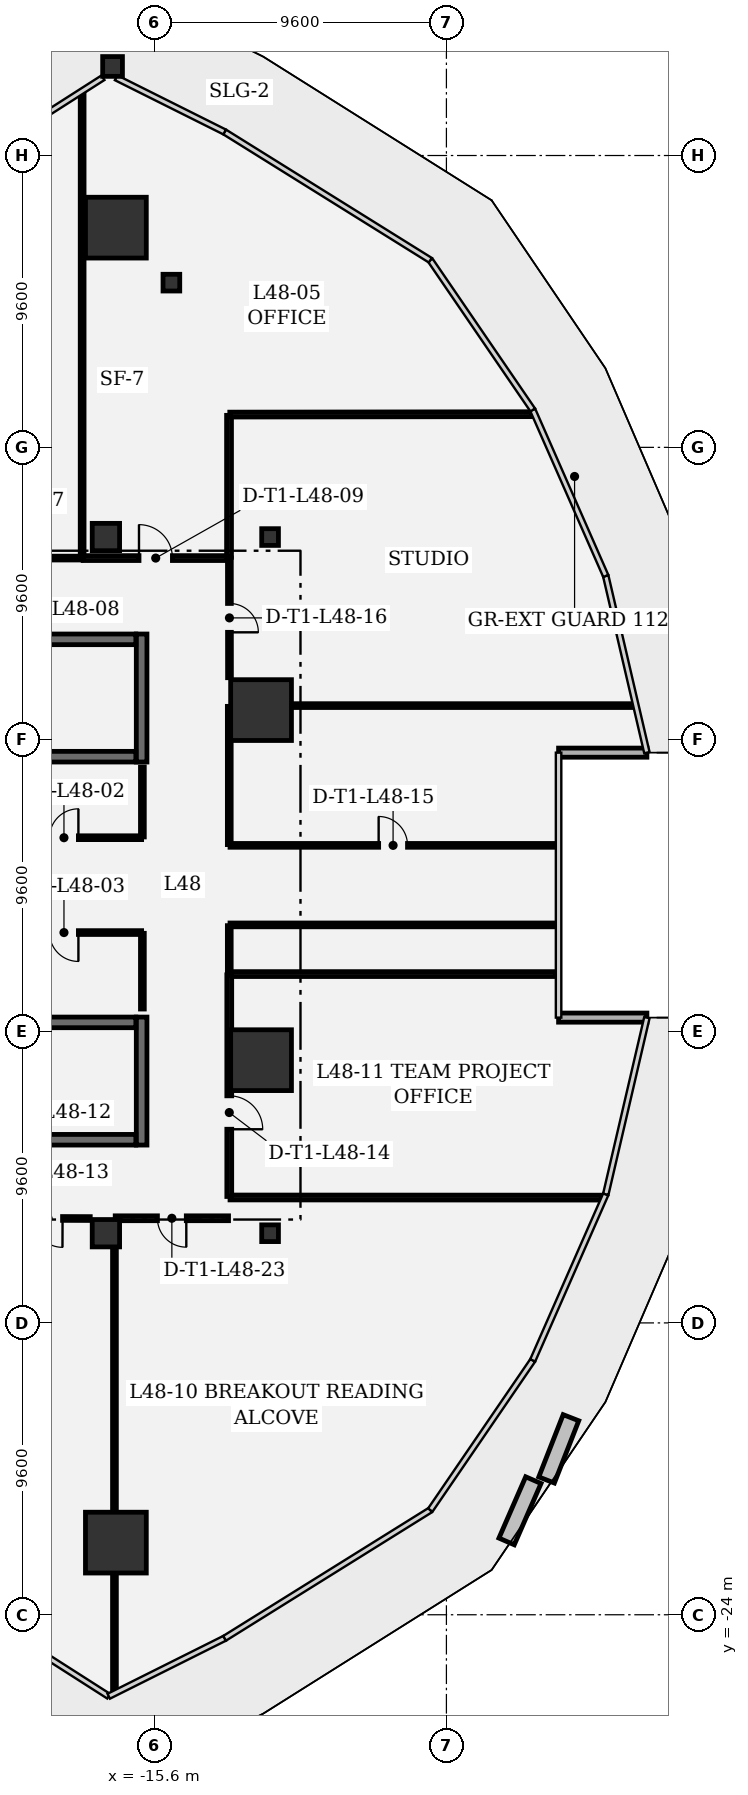
"""IFC4 building model, lengths in metres.
Left out: names, types, materials, properties, quantities, classifications, styles, units other than length and angle.
Written with IfcOpenShell. Run it as: python <this file> out.ifc"""

import sys

from ifc_helpers import new_model, si_unit, direction, frame, frame_2d, origin, origin_2d, place, context, subcontext, project, spatial, rectangle, extrude, element, fill, save


model = new_model("IFC4")
c1 = context("Model", 3, precision=1e-05, world=origin(), true_north=direction((0.0, 1.0)))
c2 = subcontext(c1, "Body", "Model", "MODEL_VIEW")
j1 = project(units=[si_unit("LENGTHUNIT", "METRE"), si_unit("PLANEANGLEUNIT", "RADIAN")], contexts=[c1])
p1 = place(None, origin())
s1 = spatial("IfcSite", under=j1, at=p1, CompositionType="ELEMENT")
p2 = place(p1, origin())
s2 = spatial("IfcBuilding", under=s1, at=p2, CompositionType="ELEMENT")
p3 = place(p2, frame((0.0, 0.0, 209.1)))
s3 = spatial("IfcBuildingStorey", under=s2, at=p3, CompositionType="ELEMENT", Elevation=209.1)
for number, where, z_axis, x_axis in (
    (1, (-16.872, -21.627, 0.0), (0.0, 0.0, 1.0), (1.0, 0.0, 0.0)),
    (2, (-12.097, -5.758, 0.0), (0.0, 0.0, 1.0), (1.0, 0.0, 0.0)),
    (3, (-12.097, 5.758, 0.0), (0.0, 0.0, 1.0), (1.0, 0.0, 0.0)),
    (4, (-16.872, 21.627, 0.0), (0.0, 0.0, 1.0), (1.0, 0.0, 0.0)),
):
    element("IfcColumn", number, at=place(p3, frame(where, z_axis=z_axis, x_axis=x_axis)), inside=s3, PredefinedType="COLUMN", context=c2, shape_type="SweptSolid", body=[
        extrude(rectangle(XDim=2.0, YDim=2.0, at=origin_2d()), origin(), (0.0, 0.0, 1.0), 4.05),
    ])
for number, where, z_axis, x_axis in (
    (5, (-17.2, 11.45, 0.0), (0.0, 0.0, 1.0), (1.0, 0.0, 0.0)),
    (6, (-17.2, -11.45, 0.0), (0.0, 0.0, 1.0), (1.0, 0.0, 0.0)),
):
    element("IfcColumn", number, at=place(p3, frame(where, z_axis=z_axis, x_axis=x_axis)), inside=s3, PredefinedType="COLUMN", context=c2, shape_type="SweptSolid", body=[
        extrude(rectangle(XDim=0.9, YDim=0.9, at=origin_2d()), origin(), (0.0, 0.0, 1.0), 4.05),
    ])
p4 = place(p3, frame((-16.981, 26.929, 0.0), z_axis=(0.0, 0.0, 1.0), x_axis=(1.0, 0.0, 0.0)))
e7 = element("IfcColumn", 7, at=p4, inside=s3, PredefinedType="COLUMN", context=c2, shape_type="SweptSolid", body=[
    extrude(rectangle(XDim=0.65, YDim=0.65, at=origin_2d()), origin(), (0.0, 0.0, 1.0), 4.05),
])
for number, where, z_axis, x_axis in (
    (8, (-15.046, 19.818, 0.0), (0.0, 0.0, 1.0), (1.0, 0.0, 0.0)),
    (9, (-11.8, -11.45, 0.0), (0.0, 0.0, 1.0), (1.0, 0.0, 0.0)),
    (10, (-11.8, 11.45, 0.0), (0.0, 0.0, 1.0), (1.0, 0.0, 0.0)),
):
    element("IfcColumn", number, at=place(p3, frame(where, z_axis=z_axis, x_axis=x_axis)), inside=s3, PredefinedType="COLUMN", context=c2, shape_type="SweptSolid", body=[
        extrude(rectangle(XDim=0.55, YDim=0.55, at=origin_2d()), origin(), (0.0, 0.0, 1.0), 4.05),
    ])
for number, where, z_axis, x_axis in (
    (11, (0.594, -4.358, 0.0), (0.0, 0.0, 1.0), (-1.0, 0.0, 0.0)),
    (12, (-2.311, 4.358, 0.0), (0.0, 0.0, 1.0), (1.0, 0.0, 0.0)),
):
    element("IfcWall", number, at=place(p3, frame(where, z_axis=z_axis, x_axis=x_axis)), inside=s3, PredefinedType="SOLIDWALL", context=c2, shape_type="SweptSolid", body=[
        extrude(rectangle(XDim=2.905, YDim=0.3, at=frame_2d((1.453, 0.0))), origin(), (0.0, 0.0, 1.0), 3.78),
    ])
p5 = place(p3, frame((-16.025, 4.05, 0.0), z_axis=(0.0, 0.0, 1.0), x_axis=(0.0, 1.0, 0.0)))
e13 = element("IfcWall", 13, at=p5, inside=s3, PredefinedType="SHEAR", context=c2, shape_type="SweptSolid", body=[
    extrude(rectangle(XDim=4.21, YDim=0.35, at=frame_2d((2.105, 0.0))), origin(), (0.0, 0.0, 1.0), 3.78),
])
p6 = place(p3, frame((-24.335, 4.225, 0.0), z_axis=(0.0, 0.0, 1.0), x_axis=(1.0, 0.0, 0.0)))
e14 = element("IfcWall", 14, at=p6, inside=s3, PredefinedType="SHEAR", context=c2, shape_type="SweptSolid", body=[
    extrude(rectangle(XDim=8.12, YDim=0.35, at=frame_2d((4.06, 0.0))), origin(), (0.0, 0.0, 1.0), 3.78),
])
p7 = place(p3, frame((-16.215, 8.085, 0.0), z_axis=(0.0, 0.0, 1.0), x_axis=(-1.0, 0.0, 0.0)))
e15 = element("IfcWall", 15, at=p7, inside=s3, PredefinedType="SHEAR", context=c2, shape_type="SweptSolid", body=[
    extrude(rectangle(XDim=8.12, YDim=0.35, at=frame_2d((4.06, 0.0))), origin(), (0.0, 0.0, 1.0), 3.78),
])
p8 = place(p7, frame((6.74, 0.0, 0.0)))
e16 = element("IfcOpeningElement", 16, at=p8, cuts=e15, PredefinedType="OPENING", context=c2, shape_type="SweptSolid", body=[
    extrude(rectangle(XDim=1.1, YDim=2.2, at=frame_2d((0.55, 1.1))), frame((0.0, 0.185, 0.0), z_axis=(0.0, -1.0, 0.0), x_axis=(1.0, 0.0, 0.0)), (0.0, 0.0, 1.0), 0.37),
])
p9 = place(p3, frame((-16.025, -8.55, 0.0), z_axis=(0.0, 0.0, 1.0), x_axis=(0.0, 1.0, 0.0)))
e17 = element("IfcWall", 17, at=p9, inside=s3, PredefinedType="SHEAR", context=c2, shape_type="SweptSolid", body=[
    extrude(rectangle(XDim=4.21, YDim=0.35, at=frame_2d((2.105, 0.0))), origin(), (0.0, 0.0, 1.0), 3.78),
])
p10 = place(p3, frame((-24.335, -8.375, 0.0), z_axis=(0.0, 0.0, 1.0), x_axis=(1.0, 0.0, 0.0)))
e18 = element("IfcWall", 18, at=p10, inside=s3, PredefinedType="SHEAR", context=c2, shape_type="SweptSolid", body=[
    extrude(rectangle(XDim=8.12, YDim=0.35, at=frame_2d((4.06, 0.0))), origin(), (0.0, 0.0, 1.0), 3.78),
])
p11 = place(p10, frame((0.28, 0.0, 0.0)))
e19 = element("IfcOpeningElement", 19, at=p11, cuts=e18, PredefinedType="OPENING", context=c2, shape_type="SweptSolid", body=[
    extrude(rectangle(XDim=1.1, YDim=2.2, at=frame_2d((0.55, 1.1))), frame((0.0, 0.185, 0.0), z_axis=(0.0, -1.0, 0.0), x_axis=(1.0, 0.0, 0.0)), (0.0, 0.0, 1.0), 0.37),
])
p12 = place(p3, frame((-16.215, -4.515, 0.0), z_axis=(0.0, 0.0, 1.0), x_axis=(-1.0, 0.0, 0.0)))
e20 = element("IfcWall", 20, at=p12, inside=s3, PredefinedType="SHEAR", context=c2, shape_type="SweptSolid", body=[
    extrude(rectangle(XDim=8.12, YDim=0.35, at=frame_2d((4.06, 0.0))), origin(), (0.0, 0.0, 1.0), 3.78),
])
p13 = place(p3, frame((-21.134, 1.56, 0.0), z_axis=(0.0, 0.0, 1.0), x_axis=(1.0, 0.0, 0.0)))
e21 = element("IfcWall", 21, at=p13, inside=s3, PredefinedType="PARTITIONING", context=c2, shape_type="SweptSolid", body=[
    extrude(rectangle(XDim=5.109, YDim=0.125, at=frame_2d((2.554, 0.0))), origin(), (0.0, 0.0, 1.0), 3.78),
])
p14 = place(p13, frame((2.079, 0.0, 0.0)))
e22 = element("IfcOpeningElement", 22, at=p14, cuts=e21, PredefinedType="OPENING", context=c2, shape_type="SweptSolid", body=[
    extrude(rectangle(XDim=0.95, YDim=2.15, at=frame_2d((0.475, 1.075))), frame((0.0, 0.073, 0.0), z_axis=(0.0, -1.0, 0.0), x_axis=(1.0, 0.0, 0.0)), (0.0, 0.0, 1.0), 0.145),
])
p15 = place(p3, frame((-16.0, 1.585, 0.0), z_axis=(0.0, 0.0, 1.0), x_axis=(0.0, 1.0, 0.0)))
e23 = element("IfcWall", 23, at=p15, inside=s3, PredefinedType="PARTITIONING", context=c2, shape_type="SweptSolid", body=[
    extrude(rectangle(XDim=2.302, YDim=0.125, at=frame_2d((1.151, 0.0))), origin(), (0.0, 0.0, 1.0), 3.78),
])
p16 = place(p3, frame((-16.0, -4.075, 0.0), z_axis=(0.0, 0.0, 1.0), x_axis=(0.0, 1.0, 0.0)))
e24 = element("IfcWall", 24, at=p16, inside=s3, PredefinedType="PARTITIONING", context=c2, shape_type="SweptSolid", body=[
    extrude(rectangle(XDim=2.49, YDim=0.125, at=frame_2d((1.245, 0.0))), origin(), (0.0, 0.0, 1.0), 3.78),
])
p17 = place(p3, frame((-16.025, -1.56, 0.0), z_axis=(0.0, 0.0, 1.0), x_axis=(-1.0, 0.0, 0.0)))
e25 = element("IfcWall", 25, at=p17, inside=s3, PredefinedType="PARTITIONING", context=c2, shape_type="SweptSolid", body=[
    extrude(rectangle(XDim=5.109, YDim=0.125, at=frame_2d((2.554, 0.0))), origin(), (0.0, 0.0, 1.0), 3.78),
])
p18 = place(p17, frame((2.079, 0.0, 0.0)))
e26 = element("IfcOpeningElement", 26, at=p18, cuts=e25, PredefinedType="OPENING", context=c2, shape_type="SweptSolid", body=[
    extrude(rectangle(XDim=0.95, YDim=2.15, at=frame_2d((0.475, 1.075))), frame((0.0, 0.073, 0.0), z_axis=(0.0, -1.0, 0.0), x_axis=(1.0, 0.0, 0.0)), (0.0, 0.0, 1.0), 0.145),
])
p19 = place(p3, frame((-22.948, 10.758, 0.0), z_axis=(0.0, 0.0, 1.0), x_axis=(1.0, 0.0, 0.0)))
e27 = element("IfcWall", 27, at=p19, inside=s3, PredefinedType="PARTITIONING", context=c2, shape_type="SweptSolid", body=[
    extrude(rectangle(XDim=4.942, YDim=0.125, at=frame_2d((2.471, 0.0))), origin(), (0.0, 0.0, 1.0), 3.78),
])
p20 = place(p19, frame((1.996, 0.0, 0.0)))
e28 = element("IfcOpeningElement", 28, at=p20, cuts=e27, PredefinedType="OPENING", context=c2, shape_type="SweptSolid", body=[
    extrude(rectangle(XDim=0.95, YDim=2.15, at=frame_2d((0.475, 1.075))), frame((0.0, 0.073, 0.0), z_axis=(0.0, -1.0, 0.0), x_axis=(1.0, 0.0, 0.0)), (0.0, 0.0, 1.0), 0.145),
])
p21 = place(p3, frame((-17.981, 10.783, 0.0), z_axis=(0.0, 0.0, 1.0), x_axis=(0.0, 1.0, 0.0)))
e29 = element("IfcWall", 29, at=p21, inside=s3, PredefinedType="PARTITIONING", context=c2, shape_type="SweptSolid", body=[
    extrude(rectangle(XDim=15.258, YDim=0.125, at=frame_2d((7.629, 0.0))), origin(), (0.0, 0.0, 1.0), 2.895),
])
p22 = place(p3, frame((-17.948, 10.758, 0.0), z_axis=(0.0, 0.0, 1.0), x_axis=(1.0, 0.0, 0.0)))
e30 = element("IfcWall", 30, at=p22, inside=s3, PredefinedType="PARTITIONING", context=c2, shape_type="SweptSolid", body=[
    extrude(rectangle(XDim=4.774, YDim=0.16, at=frame_2d((2.387, 0.0))), origin(), (0.0, 0.0, 1.0), 3.344),
])
p23 = place(p22, frame((1.837, 0.0, 0.0)))
e31 = element("IfcOpeningElement", 31, at=p23, cuts=e30, PredefinedType="OPENING", context=c2, shape_type="SweptSolid", body=[
    extrude(rectangle(XDim=1.1, YDim=2.15, at=frame_2d((0.55, 1.075))), frame((0.0, 0.09, 0.0), z_axis=(0.0, -1.0, 0.0), x_axis=(1.0, 0.0, 0.0)), (0.0, 0.0, 1.0), 0.18),
])
p24 = place(p3, frame((-13.15, 15.453, 0.0), z_axis=(0.0, 0.0, 1.0), x_axis=(0.0, -1.0, 0.0)))
e32 = element("IfcWall", 32, at=p24, inside=s3, PredefinedType="PARTITIONING", context=c2, shape_type="SweptSolid", body=[
    extrude(rectangle(XDim=4.67, YDim=0.16, at=frame_2d((2.335, 0.0))), origin(), (0.0, 0.0, 1.0), 2.9),
])
p25 = place(p3, frame((-13.125, 15.478, 0.0), z_axis=(0.0, 0.0, 1.0), x_axis=(0.999999153788, 0.001300931643, 0.0)))
e33 = element("IfcWall", 33, at=p25, inside=s3, PredefinedType="PARTITIONING", context=c2, shape_type="SweptSolid", body=[
    extrude(rectangle(XDim=9.946, YDim=0.16, at=frame_2d((4.973, 0.0))), origin(), (0.0, 0.0, 1.0), 3.78),
])
p26 = place(p3, frame((-16.919, -26.506, 0.0), z_axis=(0.0, 0.0, 1.0), x_axis=(0.0, 1.0, 0.0)))
e34 = element("IfcWall", 34, at=p26, inside=s3, PredefinedType="PARTITIONING", context=c2, shape_type="SweptSolid", body=[
    extrude(rectangle(XDim=3.814, YDim=0.125, at=frame_2d((1.907, 0.0))), origin(), (0.0, 0.0, 1.0), 3.78),
])
p27 = place(p3, frame((-16.919, -20.562, 0.0), z_axis=(0.0, 0.0, 1.0), x_axis=(0.0, 1.0, 0.0)))
e35 = element("IfcWall", 35, at=p27, inside=s3, PredefinedType="PARTITIONING", context=c2, shape_type="SweptSolid", body=[
    extrude(rectangle(XDim=8.597, YDim=0.125, at=frame_2d((4.298, 0.0))), origin(), (0.0, 0.0, 1.0), 2.9),
])
p28 = place(p3, frame((-17.715, -10.967, 0.0), z_axis=(0.0, 0.0, 1.0), x_axis=(-0.999994395436, 0.003347998857, 0.0)))
e36 = element("IfcWall", 36, at=p28, inside=s3, PredefinedType="PARTITIONING", context=c2, shape_type="SweptSolid", body=[
    extrude(rectangle(XDim=2.771, YDim=0.125, at=frame_2d((1.385, 0.0))), origin(), (0.0, 0.0, 1.0), 3.344),
])
p29 = place(p28, frame((0.91, 0.0, 0.0)))
e37 = element("IfcOpeningElement", 37, at=p29, cuts=e36, PredefinedType="OPENING", context=c2, shape_type="SweptSolid", body=[
    extrude(rectangle(XDim=0.95, YDim=2.15, at=frame_2d((0.475, 1.075))), frame((0.0, 0.073, 0.0), z_axis=(0.0, -1.0, 0.0), x_axis=(1.0, 0.0, 0.0)), (0.0, 0.0, 1.0), 0.145),
])
p30 = place(p3, frame((-0.886, -10.279, 0.0), z_axis=(0.0, 0.0, 1.0), x_axis=(-0.999999928079, 0.0003792642, 0.0)))
e38 = element("IfcWall", 38, at=p30, inside=s3, PredefinedType="PARTITIONING", context=c2, shape_type="SweptSolid", body=[
    extrude(rectangle(XDim=12.231, YDim=0.16, at=frame_2d((6.115, 0.0))), origin(), (0.0, 0.0, 1.0), 3.78),
])
p31 = place(p3, frame((-13.167, -10.958, 0.0), z_axis=(0.0, 0.0, 1.0), x_axis=(-1.0, 0.0, 0.0)))
e39 = element("IfcWall", 39, at=p31, inside=s3, PredefinedType="PARTITIONING", context=c2, shape_type="SweptSolid", body=[
    extrude(rectangle(XDim=3.727, YDim=0.16, at=frame_2d((1.863, 0.0))), origin(), (0.0, 0.0, 1.0), 3.344),
])
p32 = place(p31, frame((1.388, 0.0, 0.0)))
e40 = element("IfcOpeningElement", 40, at=p32, cuts=e39, PredefinedType="OPENING", context=c2, shape_type="SweptSolid", body=[
    extrude(rectangle(XDim=0.95, YDim=2.15, at=frame_2d((0.475, 1.075))), frame((0.0, 0.09, 0.0), z_axis=(0.0, -1.0, 0.0), x_axis=(1.0, 0.0, 0.0)), (0.0, 0.0, 1.0), 0.18),
])
p33 = place(p3, frame((-2.391, -2.926, 0.0), z_axis=(0.0, 0.0, 1.0), x_axis=(-1.0, 0.0, 0.0)))
e41 = element("IfcWall", 41, at=p33, inside=s3, PredefinedType="PARTITIONING", context=c2, shape_type="SweptSolid", body=[
    extrude(rectangle(XDim=10.726, YDim=0.16, at=frame_2d((5.363, 0.0))), origin(), (0.0, 0.0, 1.0), 3.78),
])
p34 = place(p3, frame((-13.142, -2.951, 0.0), z_axis=(0.0, 0.0, 1.0), x_axis=(0.0, -1.0, 0.0)))
e42 = element("IfcWall", 42, at=p34, inside=s3, PredefinedType="PARTITIONING", context=c2, shape_type="SweptSolid", body=[
    extrude(rectangle(XDim=7.291, YDim=0.16, at=frame_2d((3.645, 0.0))), origin(), (0.0, 0.0, 1.0), 2.9),
])
p35 = place(p34, frame((3.979, 0.0, 0.0)))
e43 = element("IfcOpeningElement", 43, at=p35, cuts=e42, PredefinedType="OPENING", context=c2, shape_type="SweptSolid", body=[
    extrude(rectangle(XDim=1.1, YDim=2.15, at=frame_2d((0.55, 1.075))), frame((0.0, 0.09, 0.0), z_axis=(0.0, -1.0, 0.0), x_axis=(1.0, 0.0, 0.0)), (0.0, 0.0, 1.0), 0.18),
])
p36 = place(p3, frame((0.154, 5.906, 0.0), z_axis=(0.0, 0.0, 1.0), x_axis=(-1.0, 0.0, 0.0)))
e44 = element("IfcWall", 44, at=p36, inside=s3, PredefinedType="PARTITIONING", context=c2, shape_type="SweptSolid", body=[
    extrude(rectangle(XDim=11.186, YDim=0.125, at=frame_2d((5.593, 0.0))), origin(), (0.0, 0.0, 1.0), 3.78),
])
p37 = place(p3, frame((-13.142, 5.881, 0.0), z_axis=(0.0, 0.0, 1.0), x_axis=(0.0, -1.0, 0.0)))
e45 = element("IfcWall", 45, at=p37, inside=s3, PredefinedType="PARTITIONING", context=c2, shape_type="SweptSolid", body=[
    extrude(rectangle(XDim=4.548, YDim=0.125, at=frame_2d((2.274, 0.0))), origin(), (0.0, 0.0, 1.0), 3.78),
])
p38 = place(p3, frame((-13.117, 1.308, 0.0), z_axis=(0.0, 0.0, 1.0), x_axis=(1.0, 0.0, 0.0)))
e46 = element("IfcWall", 46, at=p38, inside=s3, PredefinedType="PARTITIONING", context=c2, shape_type="SweptSolid", body=[
    extrude(rectangle(XDim=10.726, YDim=0.125, at=frame_2d((5.363, 0.0))), origin(), (0.0, 0.0, 1.0), 3.78),
])
p39 = place(p38, frame((4.888, 0.0, 0.0)))
e47 = element("IfcOpeningElement", 47, at=p39, cuts=e46, PredefinedType="OPENING", context=c2, shape_type="SweptSolid", body=[
    extrude(rectangle(XDim=0.95, YDim=2.15, at=frame_2d((0.475, 1.075))), frame((0.0, 0.073, 0.0), z_axis=(0.0, -1.0, 0.0), x_axis=(1.0, 0.0, 0.0)), (0.0, 0.0, 1.0), 0.145),
])
p40 = place(p3, frame((-13.117, -1.308, 0.0), z_axis=(0.0, 0.0, 1.0), x_axis=(1.0, 0.0, 0.0)))
e48 = element("IfcWall", 48, at=p40, inside=s3, PredefinedType="PARTITIONING", context=c2, shape_type="SweptSolid", body=[
    extrude(rectangle(XDim=10.726, YDim=0.125, at=frame_2d((5.363, 0.0))), origin(), (0.0, 0.0, 1.0), 3.78),
])
p41 = place(p3, frame((-13.142, -1.333, 0.0), z_axis=(0.0, 0.0, 1.0), x_axis=(0.0, -1.0, 0.0)))
e49 = element("IfcWall", 49, at=p41, inside=s3, PredefinedType="PARTITIONING", context=c2, shape_type="SweptSolid", body=[
    extrude(rectangle(XDim=1.56, YDim=0.125, at=frame_2d((0.78, 0.0))), origin(), (0.0, 0.0, 1.0), 3.78),
])
p42 = place(p3, frame((-13.138, 10.758, 0.0), z_axis=(0.0, 0.0, 1.0), x_axis=(0.000868539904, -0.999999622819, 0.0)))
e50 = element("IfcWall", 50, at=p42, inside=s3, PredefinedType="PARTITIONING", context=c2, shape_type="SweptSolid", body=[
    extrude(rectangle(XDim=3.935, YDim=0.125, at=frame_2d((1.968, 0.0))), origin(), (0.0, 0.0, 1.0), 2.9),
])
p43 = place(p42, frame((1.493, 0.0, 0.0)))
e51 = element("IfcOpeningElement", 51, at=p43, cuts=e50, PredefinedType="OPENING", context=c2, shape_type="SweptSolid", body=[
    extrude(rectangle(XDim=0.95, YDim=2.15, at=frame_2d((0.475, 1.075))), frame((0.0, 0.073, 0.0), z_axis=(0.0, -1.0, 0.0), x_axis=(1.0, 0.0, 0.0)), (0.0, 0.0, 1.0), 0.145),
])
p44 = place(p14, origin())
e52 = element("IfcDoor", 52, at=p44, inside=s3, OperationType="SINGLE_SWING_RIGHT", PredefinedType="DOOR", context=c2, shape_type="SweptSolid", body=[
    extrude(rectangle(XDim=0.95, YDim=2.15, at=frame_2d((0.475, 1.075))), frame((0.0, 0.025, 0.0), z_axis=(0.0, -1.0, 0.0), x_axis=(1.0, 0.0, 0.0)), (0.0, 0.0, 1.0), 0.05),
])
fill(e22, e52)
p45 = place(p18, origin())
e53 = element("IfcDoor", 53, at=p45, inside=s3, OperationType="SINGLE_SWING_LEFT", PredefinedType="DOOR", context=c2, shape_type="SweptSolid", body=[
    extrude(rectangle(XDim=0.95, YDim=2.15, at=frame_2d((0.475, 1.075))), frame((0.0, 0.025, 0.0), z_axis=(0.0, -1.0, 0.0), x_axis=(1.0, 0.0, 0.0)), (0.0, 0.0, 1.0), 0.05),
])
fill(e26, e53)
p46 = place(p23, origin())
e54 = element("IfcDoor", 54, at=p46, inside=s3, OperationType="SINGLE_SWING_LEFT", PredefinedType="DOOR", context=c2, shape_type="SweptSolid", body=[
    extrude(rectangle(XDim=1.1, YDim=2.15, at=frame_2d((0.55, 1.075))), frame((0.0, 0.025, 0.0), z_axis=(0.0, -1.0, 0.0), x_axis=(1.0, 0.0, 0.0)), (0.0, 0.0, 1.0), 0.05),
])
fill(e31, e54)
p47 = place(p29, origin())
e55 = element("IfcDoor", 55, at=p47, inside=s3, OperationType="SINGLE_SWING_LEFT", PredefinedType="DOOR", context=c2, shape_type="SweptSolid", body=[
    extrude(rectangle(XDim=0.95, YDim=2.15, at=frame_2d((0.475, 1.075))), frame((0.0, 0.025, 0.0), z_axis=(0.0, -1.0, 0.0), x_axis=(1.0, 0.0, 0.0)), (0.0, 0.0, 1.0), 0.05),
])
fill(e37, e55)
p48 = place(p35, origin())
e56 = element("IfcDoor", 56, at=p48, inside=s3, OperationType="SINGLE_SWING_RIGHT", PredefinedType="DOOR", context=c2, shape_type="SweptSolid", body=[
    extrude(rectangle(XDim=1.1, YDim=2.15, at=frame_2d((0.55, 1.075))), frame((0.0, 0.025, 0.0), z_axis=(0.0, -1.0, 0.0), x_axis=(1.0, 0.0, 0.0)), (0.0, 0.0, 1.0), 0.05),
])
fill(e43, e56)
p49 = place(p39, origin())
e57 = element("IfcDoor", 57, at=p49, inside=s3, OperationType="SINGLE_SWING_LEFT", PredefinedType="DOOR", context=c2, shape_type="SweptSolid", body=[
    extrude(rectangle(XDim=0.95, YDim=2.15, at=frame_2d((0.475, 1.075))), frame((0.0, 0.025, 0.0), z_axis=(0.0, -1.0, 0.0), x_axis=(1.0, 0.0, 0.0)), (0.0, 0.0, 1.0), 0.05),
])
fill(e47, e57)
p50 = place(p43, origin())
e58 = element("IfcDoor", 58, at=p50, inside=s3, OperationType="SINGLE_SWING_RIGHT", PredefinedType="DOOR", context=c2, shape_type="SweptSolid", body=[
    extrude(rectangle(XDim=0.95, YDim=2.15, at=frame_2d((0.475, 1.075))), frame((0.0, 0.025, 0.0), z_axis=(0.0, -1.0, 0.0), x_axis=(1.0, 0.0, 0.0)), (0.0, 0.0, 1.0), 0.05),
])
fill(e51, e58)
p51 = place(p32, origin())
e59 = element("IfcDoor", 59, at=p51, inside=s3, OperationType="SINGLE_SWING_LEFT", PredefinedType="DOOR", context=c2, shape_type="SweptSolid", body=[
    extrude(rectangle(XDim=0.95, YDim=2.15, at=frame_2d((0.475, 1.075))), frame((0.0, 0.025, 0.0), z_axis=(0.0, -1.0, 0.0), x_axis=(1.0, 0.0, 0.0)), (0.0, 0.0, 1.0), 0.05),
])
fill(e40, e59)
save(model, sys.argv[1])
